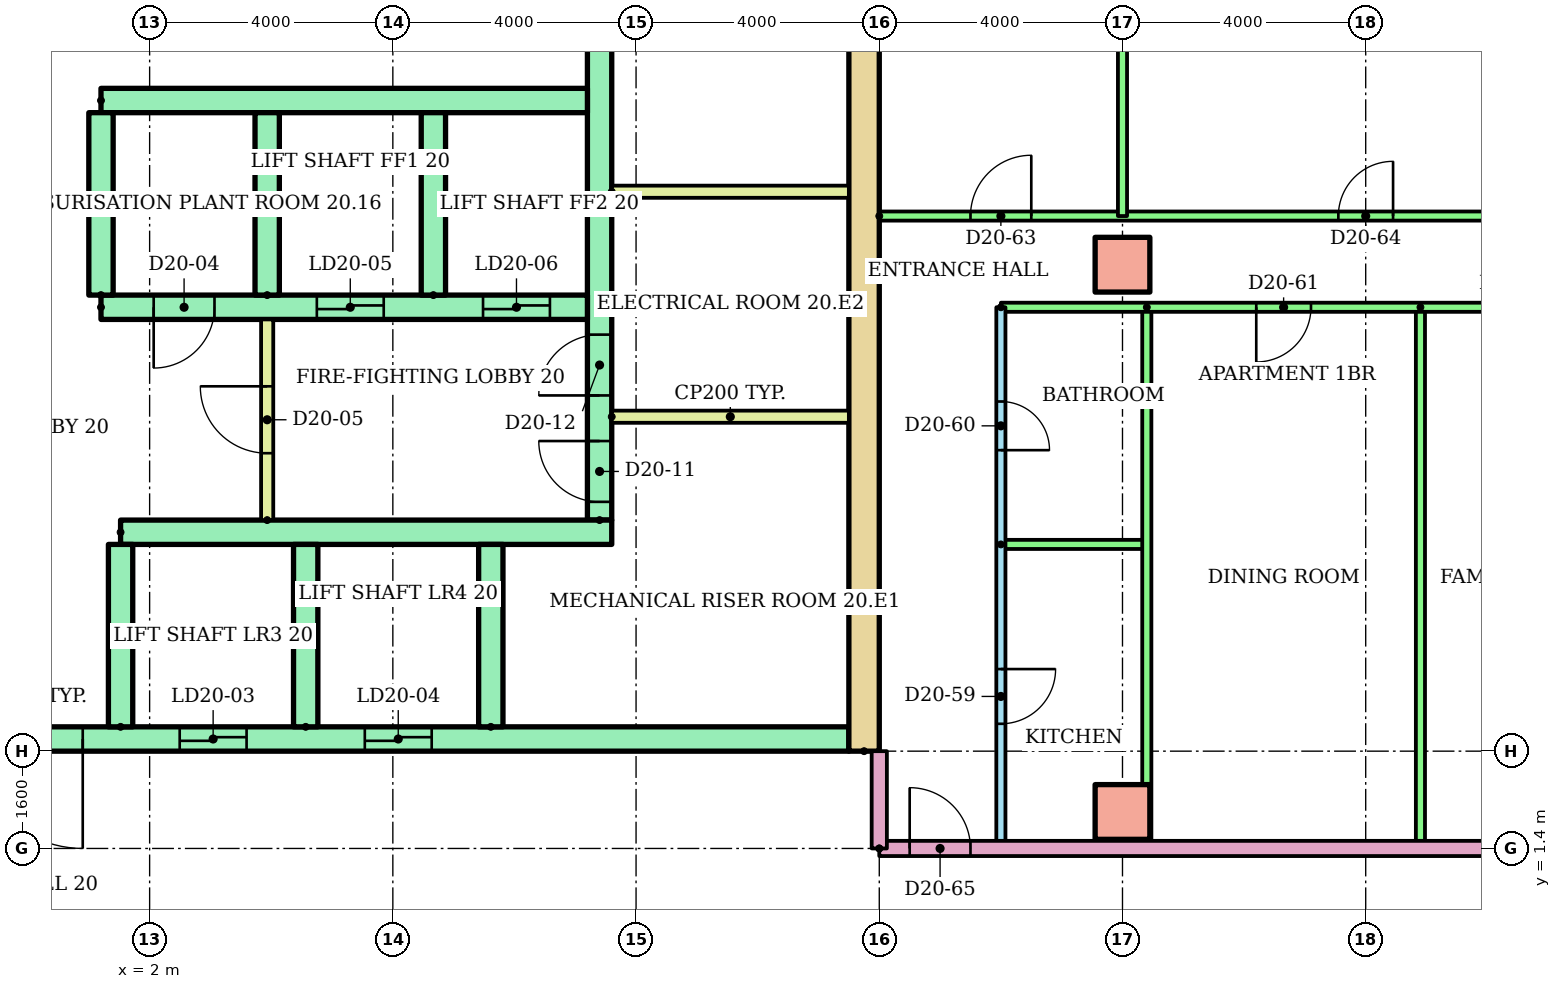
"""IFC4 building model, lengths in metres.
Left out: names, types, materials, properties, quantities, classifications, styles, units other than length and angle.
Written with IfcOpenShell. Run it as: python <this file> out.ifc"""

import sys

from ifc_helpers import new_model, si_unit, direction, frame, frame_2d, origin, origin_2d, place, context, subcontext, project, spatial, rectangle, extrude, element, fill, save


model = new_model("IFC4")
c1 = context("Model", 3, precision=1e-05, world=origin(), true_north=direction((0.0, 1.0)))
c2 = subcontext(c1, "Body", "Model", "MODEL_VIEW")
j1 = project(units=[si_unit("LENGTHUNIT", "METRE"), si_unit("PLANEANGLEUNIT", "RADIAN")], contexts=[c1])
p1 = place(None, origin())
s1 = spatial("IfcSite", under=j1, at=p1, CompositionType="ELEMENT")
p2 = place(p1, origin())
s2 = spatial("IfcBuilding", under=s1, at=p2, CompositionType="ELEMENT")
p3 = place(p2, frame((0.0, 0.0, 80.7)))
s3 = spatial("IfcBuildingStorey", under=s2, at=p3, CompositionType="ELEMENT", Elevation=80.7)
for number, where in (
    (1, (18.0, 2.0, 0.0)),
    (2, (18.0, 11.0, 0.0)),
):
    element("IfcColumn", number, at=place(p3, frame(where)), inside=s3, PredefinedType="COLUMN", context=c2, shape_type="SweptSolid", body=[
        extrude(rectangle(XDim=0.9, YDim=0.9, at=origin_2d()), origin(), (0.0, 0.0, 1.0), 3.2),
    ])
p4 = place(p3, frame((13.75, 3.0, 0.0), z_axis=(0.0, 0.0, 1.0), x_axis=(0.0, 1.0, 0.0)))
e3 = element("IfcWall", 3, at=p4, inside=s3, PredefinedType="SHEAR", context=c2, shape_type="SweptSolid", body=[
    extrude(rectangle(XDim=17.0, YDim=0.5, at=frame_2d((8.5, 0.0))), origin(), (0.0, 0.0, 1.0), 2.92),
])
p5 = place(p3, frame((9.4, 6.8, 0.0), z_axis=(0.0, 0.0, 1.0), x_axis=(0.0, 1.0, 0.0)))
e4 = element("IfcWall", 4, at=p5, inside=s3, PredefinedType="SHEAR", context=c2, shape_type="SweptSolid", body=[
    extrude(rectangle(XDim=12.7, YDim=0.4, at=frame_2d((6.35, 0.0))), origin(), (0.0, 0.0, 1.0), 2.92),
])
p6 = place(p5, frame((0.3, 0.0, 0.0)))
e5 = element("IfcOpeningElement", 5, at=p6, cuts=e4, PredefinedType="OPENING", context=c2, shape_type="SweptSolid", body=[
    extrude(rectangle(XDim=1.0, YDim=2.1, at=frame_2d((0.5, 1.05))), frame((0.0, 0.21, 0.0), z_axis=(0.0, -1.0, 0.0), x_axis=(1.0, 0.0, 0.0)), (0.0, 0.0, 1.0), 0.42),
])
p7 = place(p5, frame((2.05, 0.0, 0.0)))
e6 = element("IfcOpeningElement", 6, at=p7, cuts=e4, PredefinedType="OPENING", context=c2, shape_type="SweptSolid", body=[
    extrude(rectangle(XDim=1.0, YDim=2.1, at=frame_2d((0.5, 1.05))), frame((0.0, 0.21, 0.0), z_axis=(0.0, -1.0, 0.0), x_axis=(1.0, 0.0, 0.0)), (0.0, 0.0, 1.0), 0.42),
])
p8 = place(p5, frame((7.925, 0.0, 0.0)))
e7 = element("IfcOpeningElement", 7, at=p8, cuts=e4, PredefinedType="OPENING", context=c2, shape_type="SweptSolid", body=[
    extrude(rectangle(XDim=1.0, YDim=2.1, at=frame_2d((0.5, 1.05))), frame((0.0, 0.21, 0.0), z_axis=(0.0, -1.0, 0.0), x_axis=(1.0, 0.0, 0.0)), (0.0, 0.0, 1.0), 0.42),
])
p9 = place(p3, frame((-13.5, 3.2, 0.0)))
e8 = element("IfcWall", 8, at=p9, inside=s3, PredefinedType="SHEAR", context=c2, shape_type="SweptSolid", body=[
    extrude(rectangle(XDim=27.0, YDim=0.4, at=frame_2d((13.5, 0.0))), origin(), (0.0, 0.0, 1.0), 2.92),
])
p10 = place(p9, frame((6.861, 0.0, 0.0)))
e9 = element("IfcOpeningElement", 9, at=p10, cuts=e8, PredefinedType="OPENING", context=c2, shape_type="SweptSolid", body=[
    extrude(rectangle(XDim=1.1, YDim=2.1, at=frame_2d((0.55, 1.05))), frame((0.0, 0.21, 0.0), z_axis=(0.0, -1.0, 0.0), x_axis=(1.0, 0.0, 0.0)), (0.0, 0.0, 1.0), 0.42),
])
p11 = place(p9, frame((9.906, 0.0, 0.0)))
e10 = element("IfcOpeningElement", 10, at=p11, cuts=e8, PredefinedType="OPENING", context=c2, shape_type="SweptSolid", body=[
    extrude(rectangle(XDim=1.1, YDim=2.1, at=frame_2d((0.55, 1.05))), frame((0.0, 0.21, 0.0), z_axis=(0.0, -1.0, 0.0), x_axis=(1.0, 0.0, 0.0)), (0.0, 0.0, 1.0), 0.42),
])
p12 = place(p9, frame((15.994, 0.0, 0.0)))
e11 = element("IfcOpeningElement", 11, at=p12, cuts=e8, PredefinedType="OPENING", context=c2, shape_type="SweptSolid", body=[
    extrude(rectangle(XDim=1.1, YDim=2.1, at=frame_2d((0.55, 1.05))), frame((0.0, 0.21, 0.0), z_axis=(0.0, -1.0, 0.0), x_axis=(1.0, 0.0, 0.0)), (0.0, 0.0, 1.0), 0.42),
])
p13 = place(p9, frame((19.039, 0.0, 0.0)))
e12 = element("IfcOpeningElement", 12, at=p13, cuts=e8, PredefinedType="OPENING", context=c2, shape_type="SweptSolid", body=[
    extrude(rectangle(XDim=1.1, YDim=2.1, at=frame_2d((0.55, 1.05))), frame((0.0, 0.21, 0.0), z_axis=(0.0, -1.0, 0.0), x_axis=(1.0, 0.0, 0.0)), (0.0, 0.0, 1.0), 0.42),
])
p14 = place(p9, frame((12.6, 0.0, 0.0)))
e13 = element("IfcOpeningElement", 13, at=p14, cuts=e8, PredefinedType="OPENING", context=c2, shape_type="SweptSolid", body=[
    extrude(rectangle(XDim=1.8, YDim=2.1, at=frame_2d((0.9, 1.05))), frame((0.0, 0.21, 0.0), z_axis=(0.0, -1.0, 0.0), x_axis=(1.0, 0.0, 0.0)), (0.0, 0.0, 1.0), 0.42),
])
p15 = place(p3, frame((1.522, 6.6, 0.0)))
e14 = element("IfcWall", 14, at=p15, inside=s3, PredefinedType="SHEAR", context=c2, shape_type="SweptSolid", body=[
    extrude(rectangle(XDim=8.078, YDim=0.4, at=frame_2d((4.039, 0.0))), origin(), (0.0, 0.0, 1.0), 2.92),
])
for number, where, z_axis, x_axis in (
    (15, (1.522, 3.4, 0.0), (0.0, 0.0, 1.0), (0.0, 1.0, 0.0)),
    (16, (4.567, 3.4, 0.0), (0.0, 0.0, 1.0), (0.0, 1.0, 0.0)),
    (17, (7.611, 3.4, 0.0), (0.0, 0.0, 1.0), (0.0, 1.0, 0.0)),
):
    element("IfcWall", number, at=place(p3, frame(where, z_axis=z_axis, x_axis=x_axis)), inside=s3, PredefinedType="SHEAR", context=c2, shape_type="SweptSolid", body=[
        extrude(rectangle(XDim=3.0, YDim=0.4, at=frame_2d((1.5, 0.0))), origin(), (0.0, 0.0, 1.0), 2.92),
    ])
p16 = place(p3, frame((1.2, 10.3, 0.0)))
e18 = element("IfcWall", 18, at=p16, inside=s3, PredefinedType="SHEAR", context=c2, shape_type="SweptSolid", body=[
    extrude(rectangle(XDim=8.0, YDim=0.4, at=frame_2d((4.0, 0.0))), origin(), (0.0, 0.0, 1.0), 2.92),
])
p17 = place(p16, frame((3.55, 0.0, 0.0)))
e19 = element("IfcOpeningElement", 19, at=p17, cuts=e18, PredefinedType="OPENING", context=c2, shape_type="SweptSolid", body=[
    extrude(rectangle(XDim=1.1, YDim=2.1, at=frame_2d((0.55, 1.05))), frame((0.0, 0.21, 0.0), z_axis=(0.0, -1.0, 0.0), x_axis=(1.0, 0.0, 0.0)), (0.0, 0.0, 1.0), 0.42),
])
p18 = place(p16, frame((6.283, 0.0, 0.0)))
e20 = element("IfcOpeningElement", 20, at=p18, cuts=e18, PredefinedType="OPENING", context=c2, shape_type="SweptSolid", body=[
    extrude(rectangle(XDim=1.1, YDim=2.1, at=frame_2d((0.55, 1.05))), frame((0.0, 0.21, 0.0), z_axis=(0.0, -1.0, 0.0), x_axis=(1.0, 0.0, 0.0)), (0.0, 0.0, 1.0), 0.42),
])
p19 = place(p16, frame((0.867, 0.0, 0.0)))
e21 = element("IfcOpeningElement", 21, at=p19, cuts=e18, PredefinedType="OPENING", context=c2, shape_type="SweptSolid", body=[
    extrude(rectangle(XDim=1.0, YDim=2.1, at=frame_2d((0.5, 1.05))), frame((0.0, 0.21, 0.0), z_axis=(0.0, -1.0, 0.0), x_axis=(1.0, 0.0, 0.0)), (0.0, 0.0, 1.0), 0.42),
])
p20 = place(p3, frame((1.2, 13.7, 0.0)))
e22 = element("IfcWall", 22, at=p20, inside=s3, PredefinedType="SHEAR", context=c2, shape_type="SweptSolid", body=[
    extrude(rectangle(XDim=8.0, YDim=0.4, at=frame_2d((4.0, 0.0))), origin(), (0.0, 0.0, 1.0), 2.92),
])
for number, where, z_axis, x_axis in (
    (23, (1.2, 10.5, 0.0), (0.0, 0.0, 1.0), (0.0, 1.0, 0.0)),
    (24, (3.933, 10.5, 0.0), (0.0, 0.0, 1.0), (0.0, 1.0, 0.0)),
    (25, (6.667, 10.5, 0.0), (0.0, 0.0, 1.0), (0.0, 1.0, 0.0)),
):
    element("IfcWall", number, at=place(p3, frame(where, z_axis=z_axis, x_axis=x_axis)), inside=s3, PredefinedType="SHEAR", context=c2, shape_type="SweptSolid", body=[
        extrude(rectangle(XDim=3.0, YDim=0.4, at=frame_2d((1.5, 0.0))), origin(), (0.0, 0.0, 1.0), 2.92),
    ])
p21 = place(p3, frame((3.933, 6.8, 0.0), z_axis=(0.0, 0.0, 1.0), x_axis=(0.0, 1.0, 0.0)))
e26 = element("IfcWall", 26, at=p21, inside=s3, PredefinedType="PARTITIONING", context=c2, shape_type="SweptSolid", body=[
    extrude(rectangle(XDim=3.3, YDim=0.2, at=frame_2d((1.65, 0.0))), origin(), (0.0, 0.0, 1.0), 2.92),
])
p22 = place(p21, frame((1.1, 0.0, 0.0)))
e27 = element("IfcOpeningElement", 27, at=p22, cuts=e26, PredefinedType="OPENING", context=c2, shape_type="SweptSolid", body=[
    extrude(rectangle(XDim=1.1, YDim=2.1, at=frame_2d((0.55, 1.05))), frame((0.0, 0.11, 0.0), z_axis=(0.0, -1.0, 0.0), x_axis=(1.0, 0.0, 0.0)), (0.0, 0.0, 1.0), 0.22),
])
for number, where in (
    (28, (9.6, 8.5, 0.0)),
    (29, (9.6, 12.2, 0.0)),
):
    element("IfcWall", number, at=place(p3, frame(where)), inside=s3, PredefinedType="PARTITIONING", context=c2, shape_type="SweptSolid", body=[
        extrude(rectangle(XDim=3.9, YDim=0.2, at=frame_2d((1.95, 0.0))), origin(), (0.0, 0.0, 1.0), 2.92),
    ])
p23 = place(p3, frame((16.0, 10.3, 0.0), z_axis=(0.0, 0.0, 1.0), x_axis=(0.0, -1.0, 0.0)))
e30 = element("IfcWall", 30, at=p23, inside=s3, PredefinedType="PARTITIONING", context=c2, shape_type="SweptSolid", body=[
    extrude(rectangle(XDim=8.9, YDim=0.15, at=frame_2d((4.45, 0.0))), origin(), (0.0, 0.0, 1.0), 2.4),
])
p24 = place(p23, frame((5.95, 0.0, 0.0)))
e31 = element("IfcOpeningElement", 31, at=p24, cuts=e30, PredefinedType="OPENING", context=c2, shape_type="SweptSolid", body=[
    extrude(rectangle(XDim=0.9, YDim=2.1, at=frame_2d((0.45, 1.05))), frame((0.0, 0.085, 0.0), z_axis=(0.0, -1.0, 0.0), x_axis=(1.0, 0.0, 0.0)), (0.0, 0.0, 1.0), 0.17),
])
p25 = place(p23, frame((1.55, 0.0, 0.0)))
e32 = element("IfcOpeningElement", 32, at=p25, cuts=e30, PredefinedType="OPENING", context=c2, shape_type="SweptSolid", body=[
    extrude(rectangle(XDim=0.8, YDim=2.1, at=frame_2d((0.4, 1.05))), frame((0.0, 0.085, 0.0), z_axis=(0.0, -1.0, 0.0), x_axis=(1.0, 0.0, 0.0)), (0.0, 0.0, 1.0), 0.17),
])
p26 = place(p3, frame((16.0, 6.4, 0.0)))
e33 = element("IfcWall", 33, at=p26, inside=s3, PredefinedType="PARTITIONING", context=c2, shape_type="SweptSolid", body=[
    extrude(rectangle(XDim=2.4, YDim=0.15, at=frame_2d((1.2, 0.0))), origin(), (0.0, 0.0, 1.0), 2.4),
])
for number, where, z_axis, x_axis in (
    (34, (18.4, 10.3, 0.0), (0.0, 0.0, 1.0), (0.0, -1.0, 0.0)),
    (35, (22.9, 10.3, 0.0), (0.0, 0.0, 1.0), (0.0, -1.0, 0.0)),
):
    element("IfcWall", number, at=place(p3, frame(where, z_axis=z_axis, x_axis=x_axis)), inside=s3, PredefinedType="PARTITIONING", context=c2, shape_type="SweptSolid", body=[
        extrude(rectangle(XDim=8.9, YDim=0.15, at=frame_2d((4.45, 0.0))), origin(), (0.0, 0.0, 1.0), 2.4),
    ])
p27 = place(p3, frame((26.0, 10.3, 0.0), z_axis=(0.0, 0.0, 1.0), x_axis=(-1.0, 0.0, 0.0)))
e36 = element("IfcWall", 36, at=p27, inside=s3, PredefinedType="PARTITIONING", context=c2, shape_type="SweptSolid", body=[
    extrude(rectangle(XDim=10.0, YDim=0.15, at=frame_2d((5.0, 0.0))), origin(), (0.0, 0.0, 1.0), 2.4),
])
p28 = place(p27, frame((4.9, 0.0, 0.0)))
e37 = element("IfcOpeningElement", 37, at=p28, cuts=e36, PredefinedType="OPENING", context=c2, shape_type="SweptSolid", body=[
    extrude(rectangle(XDim=0.9, YDim=2.1, at=frame_2d((0.45, 1.05))), frame((0.0, 0.085, 0.0), z_axis=(0.0, -1.0, 0.0), x_axis=(1.0, 0.0, 0.0)), (0.0, 0.0, 1.0), 0.17),
])
p29 = place(p27, frame((1.1, 0.0, 0.0)))
e38 = element("IfcOpeningElement", 38, at=p29, cuts=e36, PredefinedType="OPENING", context=c2, shape_type="SweptSolid", body=[
    extrude(rectangle(XDim=0.9, YDim=2.1, at=frame_2d((0.45, 1.05))), frame((0.0, 0.085, 0.0), z_axis=(0.0, -1.0, 0.0), x_axis=(1.0, 0.0, 0.0)), (0.0, 0.0, 1.0), 0.17),
])
p30 = place(p3, frame((14.0, 11.8, 0.0)))
e39 = element("IfcWall", 39, at=p30, inside=s3, PredefinedType="PARTITIONING", context=c2, shape_type="SweptSolid", body=[
    extrude(rectangle(XDim=12.0, YDim=0.15, at=frame_2d((6.0, 0.0))), origin(), (0.0, 0.0, 1.0), 2.4),
])
p31 = place(p30, frame((1.5, 0.0, 0.0)))
e40 = element("IfcOpeningElement", 40, at=p31, cuts=e39, PredefinedType="OPENING", context=c2, shape_type="SweptSolid", body=[
    extrude(rectangle(XDim=1.0, YDim=2.1, at=frame_2d((0.5, 1.05))), frame((0.0, 0.085, 0.0), z_axis=(0.0, -1.0, 0.0), x_axis=(1.0, 0.0, 0.0)), (0.0, 0.0, 1.0), 0.17),
])
p32 = place(p30, frame((7.55, 0.0, 0.0)))
e41 = element("IfcOpeningElement", 41, at=p32, cuts=e39, PredefinedType="OPENING", context=c2, shape_type="SweptSolid", body=[
    extrude(rectangle(XDim=0.9, YDim=2.1, at=frame_2d((0.45, 1.05))), frame((0.0, 0.085, 0.0), z_axis=(0.0, -1.0, 0.0), x_axis=(1.0, 0.0, 0.0)), (0.0, 0.0, 1.0), 0.17),
])
p33 = place(p3, frame((18.0, 18.621, 0.0), z_axis=(0.0, 0.0, 1.0), x_axis=(0.0, -1.0, 0.0)))
e42 = element("IfcWall", 42, at=p33, inside=s3, PredefinedType="PARTITIONING", context=c2, shape_type="SweptSolid", body=[
    extrude(rectangle(XDim=6.821, YDim=0.15, at=frame_2d((3.411, 0.0))), origin(), (0.0, 0.0, 1.0), 2.4),
])
p34 = place(p3, frame((14.0, 1.4, 0.0)))
e43 = element("IfcWall", 43, at=p34, inside=s3, PredefinedType="PARTITIONING", context=c2, shape_type="SweptSolid", body=[
    extrude(rectangle(XDim=15.0, YDim=0.25, at=frame_2d((7.5, 0.0))), origin(), (0.0, 0.0, 1.0), 2.4),
])
p35 = place(p34, frame((0.5, 0.0, 0.0)))
e44 = element("IfcOpeningElement", 44, at=p35, cuts=e43, PredefinedType="OPENING", context=c2, shape_type="SweptSolid", body=[
    extrude(rectangle(XDim=1.0, YDim=2.1, at=frame_2d((0.5, 1.05))), frame((0.0, 0.135, 0.0), z_axis=(0.0, -1.0, 0.0), x_axis=(1.0, 0.0, 0.0)), (0.0, 0.0, 1.0), 0.27),
])
p36 = place(p34, frame((12.689, 0.0, 0.0)))
e45 = element("IfcOpeningElement", 45, at=p36, cuts=e43, PredefinedType="OPENING", context=c2, shape_type="SweptSolid", body=[
    extrude(rectangle(XDim=1.0, YDim=2.1, at=frame_2d((0.5, 1.05))), frame((0.0, 0.135, 0.0), z_axis=(0.0, -1.0, 0.0), x_axis=(1.0, 0.0, 0.0)), (0.0, 0.0, 1.0), 0.27),
])
p37 = place(p3, frame((14.0, 1.4, 0.0), z_axis=(0.0, 0.0, 1.0), x_axis=(0.0, 1.0, 0.0)))
e46 = element("IfcWall", 46, at=p37, inside=s3, PredefinedType="PARTITIONING", context=c2, shape_type="SweptSolid", body=[
    extrude(rectangle(XDim=1.6, YDim=0.25, at=frame_2d((0.8, 0.0))), origin(), (0.0, 0.0, 1.0), 2.4),
])
p38 = place(p12, origin())
e47 = element("IfcDoor", 47, at=p38, inside=s3, OperationType="SLIDING_TO_LEFT", PredefinedType="DOOR", context=c2, shape_type="SweptSolid", body=[
    extrude(rectangle(XDim=1.1, YDim=2.1, at=frame_2d((0.55, 1.05))), frame((0.0, 0.025, 0.0), z_axis=(0.0, -1.0, 0.0), x_axis=(1.0, 0.0, 0.0)), (0.0, 0.0, 1.0), 0.05),
])
fill(e11, e47)
p39 = place(p13, origin())
e48 = element("IfcDoor", 48, at=p39, inside=s3, OperationType="SLIDING_TO_LEFT", PredefinedType="DOOR", context=c2, shape_type="SweptSolid", body=[
    extrude(rectangle(XDim=1.1, YDim=2.1, at=frame_2d((0.55, 1.05))), frame((0.0, 0.025, 0.0), z_axis=(0.0, -1.0, 0.0), x_axis=(1.0, 0.0, 0.0)), (0.0, 0.0, 1.0), 0.05),
])
fill(e12, e48)
p40 = place(p14, frame((1.8, 0.0, 0.0), z_axis=(0.0, 0.0, 1.0), x_axis=(-1.0, 0.0, 0.0)))
e49 = element("IfcDoor", 49, at=p40, inside=s3, OperationType="DOUBLE_DOOR_SINGLE_SWING", PredefinedType="DOOR", context=c2, shape_type="SweptSolid", body=[
    extrude(rectangle(XDim=1.8, YDim=2.1, at=frame_2d((0.9, 1.05))), frame((0.0, 0.025, 0.0), z_axis=(0.0, -1.0, 0.0), x_axis=(1.0, 0.0, 0.0)), (0.0, 0.0, 1.0), 0.05),
])
fill(e13, e49)
p41 = place(p17, origin())
e50 = element("IfcDoor", 50, at=p41, inside=s3, OperationType="SLIDING_TO_LEFT", PredefinedType="DOOR", context=c2, shape_type="SweptSolid", body=[
    extrude(rectangle(XDim=1.1, YDim=2.1, at=frame_2d((0.55, 1.05))), frame((0.0, 0.025, 0.0), z_axis=(0.0, -1.0, 0.0), x_axis=(1.0, 0.0, 0.0)), (0.0, 0.0, 1.0), 0.05),
])
fill(e19, e50)
p42 = place(p18, origin())
e51 = element("IfcDoor", 51, at=p42, inside=s3, OperationType="SLIDING_TO_LEFT", PredefinedType="DOOR", context=c2, shape_type="SweptSolid", body=[
    extrude(rectangle(XDim=1.1, YDim=2.1, at=frame_2d((0.55, 1.05))), frame((0.0, 0.025, 0.0), z_axis=(0.0, -1.0, 0.0), x_axis=(1.0, 0.0, 0.0)), (0.0, 0.0, 1.0), 0.05),
])
fill(e20, e51)
p43 = place(p19, frame((1.0, 0.0, 0.0), z_axis=(0.0, 0.0, 1.0), x_axis=(-1.0, 0.0, 0.0)))
e52 = element("IfcDoor", 52, at=p43, inside=s3, OperationType="SINGLE_SWING_LEFT", PredefinedType="DOOR", context=c2, shape_type="SweptSolid", body=[
    extrude(rectangle(XDim=1.0, YDim=2.1, at=frame_2d((0.5, 1.05))), frame((0.0, 0.025, 0.0), z_axis=(0.0, -1.0, 0.0), x_axis=(1.0, 0.0, 0.0)), (0.0, 0.0, 1.0), 0.05),
])
fill(e21, e52)
p44 = place(p22, origin())
e53 = element("IfcDoor", 53, at=p44, inside=s3, OperationType="SINGLE_SWING_RIGHT", PredefinedType="DOOR", context=c2, shape_type="SweptSolid", body=[
    extrude(rectangle(XDim=1.1, YDim=2.1, at=frame_2d((0.55, 1.05))), frame((0.0, 0.025, 0.0), z_axis=(0.0, -1.0, 0.0), x_axis=(1.0, 0.0, 0.0)), (0.0, 0.0, 1.0), 0.05),
])
fill(e27, e53)
p45 = place(p6, origin())
e54 = element("IfcDoor", 54, at=p45, inside=s3, OperationType="SINGLE_SWING_RIGHT", PredefinedType="DOOR", context=c2, shape_type="SweptSolid", body=[
    extrude(rectangle(XDim=1.0, YDim=2.1, at=frame_2d((0.5, 1.05))), frame((0.0, 0.025, 0.0), z_axis=(0.0, -1.0, 0.0), x_axis=(1.0, 0.0, 0.0)), (0.0, 0.0, 1.0), 0.05),
])
fill(e5, e54)
p46 = place(p7, origin())
e55 = element("IfcDoor", 55, at=p46, inside=s3, OperationType="SINGLE_SWING_LEFT", PredefinedType="DOOR", context=c2, shape_type="SweptSolid", body=[
    extrude(rectangle(XDim=1.0, YDim=2.1, at=frame_2d((0.5, 1.05))), frame((0.0, 0.025, 0.0), z_axis=(0.0, -1.0, 0.0), x_axis=(1.0, 0.0, 0.0)), (0.0, 0.0, 1.0), 0.05),
])
fill(e6, e55)
p47 = place(p24, origin())
e56 = element("IfcDoor", 56, at=p47, inside=s3, OperationType="SINGLE_SWING_LEFT", PredefinedType="DOOR", context=c2, shape_type="SweptSolid", body=[
    extrude(rectangle(XDim=0.9, YDim=2.1, at=frame_2d((0.45, 1.05))), frame((0.0, 0.025, 0.0), z_axis=(0.0, -1.0, 0.0), x_axis=(1.0, 0.0, 0.0)), (0.0, 0.0, 1.0), 0.05),
])
fill(e31, e56)
p48 = place(p25, origin())
e57 = element("IfcDoor", 57, at=p48, inside=s3, OperationType="SINGLE_SWING_RIGHT", PredefinedType="DOOR", context=c2, shape_type="SweptSolid", body=[
    extrude(rectangle(XDim=0.8, YDim=2.1, at=frame_2d((0.4, 1.05))), frame((0.0, 0.025, 0.0), z_axis=(0.0, -1.0, 0.0), x_axis=(1.0, 0.0, 0.0)), (0.0, 0.0, 1.0), 0.05),
])
fill(e32, e57)
p49 = place(p28, origin())
e58 = element("IfcDoor", 58, at=p49, inside=s3, OperationType="SINGLE_SWING_RIGHT", PredefinedType="DOOR", context=c2, shape_type="SweptSolid", body=[
    extrude(rectangle(XDim=0.9, YDim=2.1, at=frame_2d((0.45, 1.05))), frame((0.0, 0.025, 0.0), z_axis=(0.0, -1.0, 0.0), x_axis=(1.0, 0.0, 0.0)), (0.0, 0.0, 1.0), 0.05),
])
fill(e37, e58)
p50 = place(p31, origin())
e59 = element("IfcDoor", 59, at=p50, inside=s3, OperationType="SINGLE_SWING_RIGHT", PredefinedType="DOOR", context=c2, shape_type="SweptSolid", body=[
    extrude(rectangle(XDim=1.0, YDim=2.1, at=frame_2d((0.5, 1.05))), frame((0.0, 0.025, 0.0), z_axis=(0.0, -1.0, 0.0), x_axis=(1.0, 0.0, 0.0)), (0.0, 0.0, 1.0), 0.05),
])
fill(e40, e59)
p51 = place(p32, origin())
e60 = element("IfcDoor", 60, at=p51, inside=s3, OperationType="SINGLE_SWING_RIGHT", PredefinedType="DOOR", context=c2, shape_type="SweptSolid", body=[
    extrude(rectangle(XDim=0.9, YDim=2.1, at=frame_2d((0.45, 1.05))), frame((0.0, 0.025, 0.0), z_axis=(0.0, -1.0, 0.0), x_axis=(1.0, 0.0, 0.0)), (0.0, 0.0, 1.0), 0.05),
])
fill(e41, e60)
p52 = place(p35, origin())
e61 = element("IfcDoor", 61, at=p52, inside=s3, OperationType="SINGLE_SWING_LEFT", PredefinedType="DOOR", context=c2, shape_type="SweptSolid", body=[
    extrude(rectangle(XDim=1.0, YDim=2.1, at=frame_2d((0.5, 1.05))), frame((0.0, 0.025, 0.0), z_axis=(0.0, -1.0, 0.0), x_axis=(1.0, 0.0, 0.0)), (0.0, 0.0, 1.0), 0.05),
])
fill(e44, e61)
save(model, sys.argv[1])
